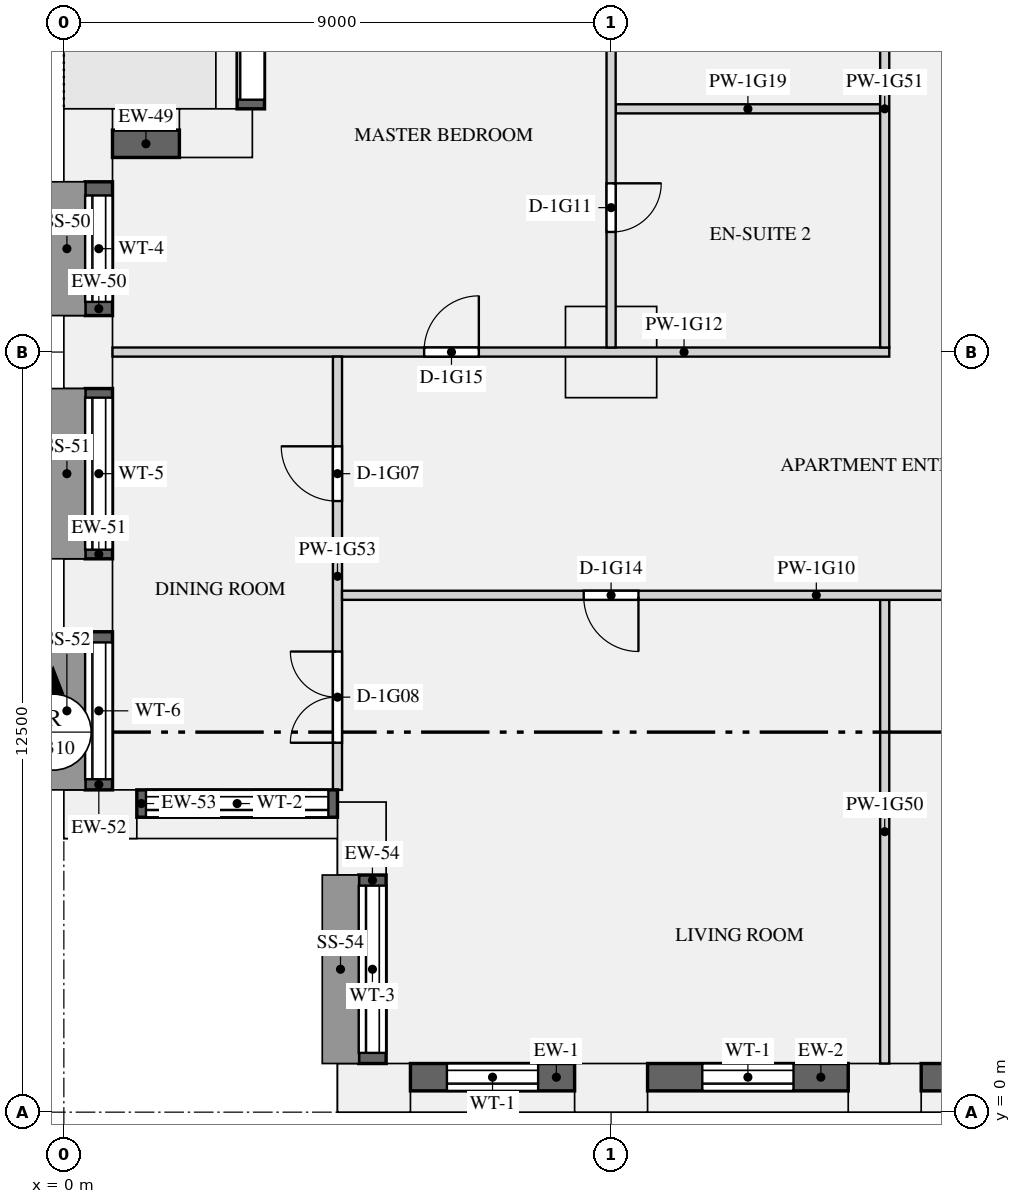
"""IFC4 building model, lengths in metres.
Left out: names, types, materials, properties, quantities, classifications, styles, units other than length and angle.
Written with IfcOpenShell. Run it as: python <this file> out.ifc"""

import sys

from ifc_helpers import new_model, si_unit, direction, frame, frame_2d, origin, origin_2d, place, context, subcontext, project, spatial, rectangle, extrude, element, fill, save


model = new_model("IFC4")
c1 = context("Model", 3, precision=1e-05, world=origin(), true_north=direction((0.0, 1.0)))
c2 = subcontext(c1, "Body", "Model", "MODEL_VIEW")
j1 = project(units=[si_unit("LENGTHUNIT", "METRE"), si_unit("PLANEANGLEUNIT", "RADIAN")], contexts=[c1])
p1 = place(None, origin())
s1 = spatial("IfcSite", under=j1, at=p1, CompositionType="ELEMENT")
p2 = place(p1, origin())
s2 = spatial("IfcBuilding", under=s1, at=p2, CompositionType="ELEMENT")
p3 = place(p2, frame((0.0, 0.0, 69.9)))
s3 = spatial("IfcBuildingStorey", under=s2, at=p3, CompositionType="ELEMENT", Elevation=69.9)
p4 = place(p3, frame((5.1, 0.4, 0.0), z_axis=(0.0, 0.0, 1.0), x_axis=(1.0, 0.0, 0.0)))
e1 = element("IfcColumn", 1, at=p4, inside=s3, PredefinedType="USERDEFINED", context=c2, shape_type="SweptSolid", body=[
    extrude(rectangle(XDim=1.2, YDim=0.8, at=origin_2d()), origin(), (0.0, 0.0, 1.0), 2.65),
])
for number, where, z_axis, x_axis in (
    (2, (9.0, 0.4, 0.0), (0.0, 0.0, 1.0), (1.0, 0.0, 0.0)),
    (3, (13.5, 0.4, 0.0), (0.0, 0.0, 1.0), (1.0, 0.0, 0.0)),
):
    element("IfcColumn", number, at=place(p3, frame(where, z_axis=z_axis, x_axis=x_axis)), inside=s3, PredefinedType="USERDEFINED", context=c2, shape_type="SweptSolid", body=[
        extrude(rectangle(XDim=1.2, YDim=0.8, at=origin_2d()), origin(), (0.0, 0.0, 1.0), 3.15),
    ])
for number, where, z_axis, x_axis in (
    (4, (2.5, 16.1, 0.0), (0.0, 0.0, 1.0), (-1.0, 0.0, 0.0)),
    (5, (0.4, 15.9, 0.0), (0.0, 0.0, 1.0), (0.0, -1.0, 0.0)),
    (6, (0.4, 12.5, 0.0), (0.0, 0.0, 1.0), (0.0, -1.0, 0.0)),
    (7, (0.4, 8.5, 0.0), (0.0, 0.0, 1.0), (0.0, -1.0, 0.0)),
):
    element("IfcColumn", number, at=place(p3, frame(where, z_axis=z_axis, x_axis=x_axis)), inside=s3, PredefinedType="USERDEFINED", context=c2, shape_type="SweptSolid", body=[
        extrude(rectangle(XDim=1.2, YDim=0.8, at=origin_2d()), origin(), (0.0, 0.0, 1.0), 2.65),
    ])
for number, where, z_axis, x_axis in (
    (8, (0.6, 4.9, 0.0), (0.0, 0.0, 1.0), (1.0, 0.0, 0.0)),
    (9, (4.9, 4.5, 0.0), (0.0, 0.0, 1.0), (0.0, -1.0, 0.0)),
):
    element("IfcColumn", number, at=place(p3, frame(where, z_axis=z_axis, x_axis=x_axis)), inside=s3, PredefinedType="USERDEFINED", context=c2, shape_type="SweptSolid", body=[
        extrude(rectangle(XDim=1.2, YDim=0.8, at=origin_2d()), origin(), (0.0, 0.0, 1.0), 3.15),
    ])
p5 = place(p3, frame((9.0, 12.5, 0.0), z_axis=(0.0, 0.0, 1.0), x_axis=(1.0, 0.0, 0.0)))
e10 = element("IfcColumn", 10, at=p5, inside=s3, PredefinedType="COLUMN", context=c2, shape_type="SweptSolid", body=[
    extrude(rectangle(XDim=1.5, YDim=1.5, at=origin_2d()), origin(), (0.0, 0.0, 1.0), 3.15),
])
p6 = place(p3, frame((5.7, 0.575, 0.9), z_axis=(0.0, 0.0, 1.0), x_axis=(1.0, 0.0, 0.0)))
e11 = element("IfcWall", 11, at=p6, inside=s3, PredefinedType="SOLIDWALL", context=c2, shape_type="SweptSolid", body=[
    extrude(rectangle(XDim=2.7, YDim=0.45, at=frame_2d((1.35, 0.0))), origin(), (0.0, 0.0, 1.0), 1.75),
])
p7 = place(p6, frame((0.6, 0.0, 0.15)))
e12 = element("IfcOpeningElement", 12, at=p7, cuts=e11, PredefinedType="OPENING", context=c2, shape_type="SweptSolid", body=[
    extrude(rectangle(XDim=1.5, YDim=1.5, at=frame_2d((0.75, 0.75))), frame((0.0, 0.235, 0.0), z_axis=(0.0, -1.0, 0.0), x_axis=(1.0, 0.0, 0.0)), (0.0, 0.0, 1.0), 0.47),
])
p8 = place(p3, frame((9.6, 0.575, 0.9), z_axis=(0.0, 0.0, 1.0), x_axis=(1.0, 0.0, 0.0)))
e13 = element("IfcWall", 13, at=p8, inside=s3, PredefinedType="SOLIDWALL", context=c2, shape_type="SweptSolid", body=[
    extrude(rectangle(XDim=3.3, YDim=0.45, at=frame_2d((1.65, 0.0))), origin(), (0.0, 0.0, 1.0), 1.75),
])
p9 = place(p8, frame((0.9, 0.0, 0.15)))
e14 = element("IfcOpeningElement", 14, at=p9, cuts=e13, PredefinedType="OPENING", context=c2, shape_type="SweptSolid", body=[
    extrude(rectangle(XDim=1.5, YDim=1.5, at=frame_2d((0.75, 0.75))), frame((0.0, 0.235, 0.0), z_axis=(0.0, -1.0, 0.0), x_axis=(1.0, 0.0, 0.0)), (0.0, 0.0, 1.0), 0.47),
])
p10 = place(p3, frame((14.1, 0.575, 0.9), z_axis=(0.0, 0.0, 1.0), x_axis=(1.0, 0.0, 0.0)))
e15 = element("IfcWall", 15, at=p10, inside=s3, PredefinedType="SOLIDWALL", context=c2, shape_type="SweptSolid", body=[
    extrude(rectangle(XDim=3.9, YDim=0.45, at=frame_2d((1.95, 0.0))), origin(), (0.0, 0.0, 1.0), 1.75),
])
p11 = place(p10, frame((1.2, 0.0, 0.15)))
e16 = element("IfcOpeningElement", 16, at=p11, cuts=e15, PredefinedType="OPENING", context=c2, shape_type="SweptSolid", body=[
    extrude(rectangle(XDim=1.5, YDim=1.5, at=frame_2d((0.75, 0.75))), frame((0.0, 0.235, 0.0), z_axis=(0.0, -1.0, 0.0), x_axis=(1.0, 0.0, 0.0)), (0.0, 0.0, 1.0), 0.47),
])
p12 = place(p3, frame((3.075, 19.9, 0.0), z_axis=(0.0, 0.0, 1.0), x_axis=(0.0, -1.0, 0.0)))
e17 = element("IfcWall", 17, at=p12, inside=s3, PredefinedType="SOLIDWALL", context=c2, shape_type="SweptSolid", body=[
    extrude(rectangle(XDim=3.4, YDim=0.45, at=frame_2d((1.7, 0.0))), origin(), (0.0, 0.0, 1.0), 2.65),
])
p13 = place(p12, frame((0.15, 0.0, 0.0)))
e18 = element("IfcOpeningElement", 18, at=p13, cuts=e17, PredefinedType="OPENING", context=c2, shape_type="SweptSolid", body=[
    extrude(rectangle(XDim=3.1, YDim=2.3, at=frame_2d((1.55, 1.15))), frame((0.0, 0.235, 0.0), z_axis=(0.0, -1.0, 0.0), x_axis=(1.0, 0.0, 0.0)), (0.0, 0.0, 1.0), 0.47),
])
p14 = place(p3, frame((1.9, 15.925, 0.9), z_axis=(0.0, 0.0, 1.0), x_axis=(-1.0, 0.0, 0.0)))
e19 = element("IfcWall", 19, at=p14, inside=s3, PredefinedType="SOLIDWALL", context=c2, shape_type="SweptSolid", body=[
    extrude(rectangle(XDim=1.1, YDim=0.45, at=frame_2d((0.55, 0.0))), origin(), (0.0, 0.0, 1.0), 1.75),
])
p15 = place(p3, frame((0.575, 15.3, 0.9), z_axis=(0.0, 0.0, 1.0), x_axis=(0.0, -1.0, 0.0)))
e20 = element("IfcWall", 20, at=p15, inside=s3, PredefinedType="SOLIDWALL", context=c2, shape_type="SweptSolid", body=[
    extrude(rectangle(XDim=2.2, YDim=0.45, at=frame_2d((1.1, 0.0))), origin(), (0.0, 0.0, 1.0), 1.75),
])
p16 = place(p15, frame((0.225, 0.0, 0.15)))
e21 = element("IfcOpeningElement", 21, at=p16, cuts=e20, PredefinedType="OPENING", context=c2, shape_type="SweptSolid", body=[
    extrude(rectangle(XDim=1.75, YDim=1.5, at=frame_2d((0.875, 0.75))), frame((0.0, 0.235, 0.0), z_axis=(0.0, -1.0, 0.0), x_axis=(1.0, 0.0, 0.0)), (0.0, 0.0, 1.0), 0.47),
])
p17 = place(p3, frame((0.575, 11.9, 0.9), z_axis=(0.0, 0.0, 1.0), x_axis=(0.0, -1.0, 0.0)))
e22 = element("IfcWall", 22, at=p17, inside=s3, PredefinedType="SOLIDWALL", context=c2, shape_type="SweptSolid", body=[
    extrude(rectangle(XDim=2.8, YDim=0.45, at=frame_2d((1.4, 0.0))), origin(), (0.0, 0.0, 1.0), 1.75),
])
p18 = place(p17, frame((0.15, 0.0, 0.15)))
e23 = element("IfcOpeningElement", 23, at=p18, cuts=e22, PredefinedType="OPENING", context=c2, shape_type="SweptSolid", body=[
    extrude(rectangle(XDim=2.5, YDim=1.5, at=frame_2d((1.25, 0.75))), frame((0.0, 0.235, 0.0), z_axis=(0.0, -1.0, 0.0), x_axis=(1.0, 0.0, 0.0)), (0.0, 0.0, 1.0), 0.47),
])
p19 = place(p3, frame((0.575, 7.9, 0.9), z_axis=(0.0, 0.0, 1.0), x_axis=(0.0, -1.0, 0.0)))
e24 = element("IfcWall", 24, at=p19, inside=s3, PredefinedType="SOLIDWALL", context=c2, shape_type="SweptSolid", body=[
    extrude(rectangle(XDim=2.6, YDim=0.45, at=frame_2d((1.3, 0.0))), origin(), (0.0, 0.0, 1.0), 1.75),
])
p20 = place(p19, frame((0.175, 0.0, 0.15)))
e25 = element("IfcOpeningElement", 25, at=p20, cuts=e24, PredefinedType="OPENING", context=c2, shape_type="SweptSolid", body=[
    extrude(rectangle(XDim=2.25, YDim=1.5, at=frame_2d((1.125, 0.75))), frame((0.0, 0.235, 0.0), z_axis=(0.0, -1.0, 0.0), x_axis=(1.0, 0.0, 0.0)), (0.0, 0.0, 1.0), 0.47),
])
p21 = place(p3, frame((1.2, 5.075, 0.9), z_axis=(0.0, 0.0, 1.0), x_axis=(1.0, 0.0, 0.0)))
e26 = element("IfcWall", 26, at=p21, inside=s3, PredefinedType="SOLIDWALL", context=c2, shape_type="SweptSolid", body=[
    extrude(rectangle(XDim=3.3, YDim=0.45, at=frame_2d((1.65, 0.0))), origin(), (0.0, 0.0, 1.0), 1.75),
])
p22 = place(p21, frame((0.15, 0.0, 0.15)))
e27 = element("IfcOpeningElement", 27, at=p22, cuts=e26, PredefinedType="OPENING", context=c2, shape_type="SweptSolid", body=[
    extrude(rectangle(XDim=3.0, YDim=1.5, at=frame_2d((1.5, 0.75))), frame((0.0, 0.235, 0.0), z_axis=(0.0, -1.0, 0.0), x_axis=(1.0, 0.0, 0.0)), (0.0, 0.0, 1.0), 0.47),
])
p23 = place(p3, frame((5.075, 3.9, 0.9), z_axis=(0.0, 0.0, 1.0), x_axis=(0.0, -1.0, 0.0)))
e28 = element("IfcWall", 28, at=p23, inside=s3, PredefinedType="SOLIDWALL", context=c2, shape_type="SweptSolid", body=[
    extrude(rectangle(XDim=3.1, YDim=0.45, at=frame_2d((1.55, 0.0))), origin(), (0.0, 0.0, 1.0), 1.75),
])
p24 = place(p23, frame((0.175, 0.0, 0.15)))
e29 = element("IfcOpeningElement", 29, at=p24, cuts=e28, PredefinedType="OPENING", context=c2, shape_type="SweptSolid", body=[
    extrude(rectangle(XDim=2.75, YDim=1.5, at=frame_2d((1.375, 0.75))), frame((0.0, 0.235, 0.0), z_axis=(0.0, -1.0, 0.0), x_axis=(1.0, 0.0, 0.0)), (0.0, 0.0, 1.0), 0.47),
])
p25 = place(p3, frame((4.575, 8.5, 0.0), z_axis=(0.0, 0.0, 1.0), x_axis=(1.0, 0.0, 0.0)))
e30 = element("IfcWall", 30, at=p25, inside=s3, PredefinedType="PARTITIONING", context=c2, shape_type="SweptSolid", body=[
    extrude(rectangle(XDim=13.425, YDim=0.15, at=frame_2d((6.712, 0.0))), origin(), (0.0, 0.0, 1.0), 2.65),
])
p26 = place(p25, frame((10.725, 0.0, 0.0)))
e31 = element("IfcOpeningElement", 31, at=p26, cuts=e30, PredefinedType="OPENING", context=c2, shape_type="SweptSolid", body=[
    extrude(rectangle(XDim=0.9, YDim=2.1, at=frame_2d((0.45, 1.05))), frame((0.0, 0.085, 0.0), z_axis=(0.0, -1.0, 0.0), x_axis=(1.0, 0.0, 0.0)), (0.0, 0.0, 1.0), 0.17),
])
p27 = place(p25, frame((3.975, 0.0, 0.0)))
e32 = element("IfcOpeningElement", 32, at=p27, cuts=e30, PredefinedType="OPENING", context=c2, shape_type="SweptSolid", body=[
    extrude(rectangle(XDim=0.9, YDim=2.1, at=frame_2d((0.45, 1.05))), frame((0.0, 0.085, 0.0), z_axis=(0.0, -1.0, 0.0), x_axis=(1.0, 0.0, 0.0)), (0.0, 0.0, 1.0), 0.17),
])
p28 = place(p3, frame((0.8, 12.5, 0.0), z_axis=(0.0, 0.0, 1.0), x_axis=(1.0, 0.0, 0.0)))
e33 = element("IfcWall", 33, at=p28, inside=s3, PredefinedType="PARTITIONING", context=c2, shape_type="SweptSolid", body=[
    extrude(rectangle(XDim=12.775, YDim=0.15, at=frame_2d((6.387, 0.0))), origin(), (0.0, 0.0, 1.0), 2.65),
])
p29 = place(p28, frame((5.125, 0.0, 0.0)))
e34 = element("IfcOpeningElement", 34, at=p29, cuts=e33, PredefinedType="OPENING", context=c2, shape_type="SweptSolid", body=[
    extrude(rectangle(XDim=0.9, YDim=2.1, at=frame_2d((0.45, 1.05))), frame((0.0, 0.085, 0.0), z_axis=(0.0, -1.0, 0.0), x_axis=(1.0, 0.0, 0.0)), (0.0, 0.0, 1.0), 0.17),
])
p30 = place(p3, frame((9.075, 16.5, 0.0), z_axis=(0.0, 0.0, 1.0), x_axis=(1.0, 0.0, 0.0)))
e35 = element("IfcWall", 35, at=p30, inside=s3, PredefinedType="PARTITIONING", context=c2, shape_type="SweptSolid", body=[
    extrude(rectangle(XDim=4.35, YDim=0.15, at=frame_2d((2.175, 0.0))), origin(), (0.0, 0.0, 1.0), 2.65),
])
p31 = place(p3, frame((13.5, 0.8, 0.0), z_axis=(0.0, 0.0, 1.0), x_axis=(0.0, 1.0, 0.0)))
e36 = element("IfcWall", 36, at=p31, inside=s3, PredefinedType="PARTITIONING", context=c2, shape_type="SweptSolid", body=[
    extrude(rectangle(XDim=7.625, YDim=0.15, at=frame_2d((3.812, 0.0))), origin(), (0.0, 0.0, 1.0), 2.65),
])
p32 = place(p3, frame((13.5, 12.575, 0.0), z_axis=(0.0, 0.0, 1.0), x_axis=(0.0, 1.0, 0.0)))
e37 = element("IfcWall", 37, at=p32, inside=s3, PredefinedType="PARTITIONING", context=c2, shape_type="SweptSolid", body=[
    extrude(rectangle(XDim=7.85, YDim=0.15, at=frame_2d((3.925, 0.0))), origin(), (0.0, 0.0, 1.0), 2.65),
])
p33 = place(p3, frame((4.5, 5.3, 0.0), z_axis=(0.0, 0.0, 1.0), x_axis=(0.0, 1.0, 0.0)))
e38 = element("IfcWall", 38, at=p33, inside=s3, PredefinedType="PARTITIONING", context=c2, shape_type="SweptSolid", body=[
    extrude(rectangle(XDim=7.125, YDim=0.15, at=frame_2d((3.562, 0.0))), origin(), (0.0, 0.0, 1.0), 2.65),
])
p34 = place(p33, frame((4.75, 0.0, 0.0)))
e39 = element("IfcOpeningElement", 39, at=p34, cuts=e38, PredefinedType="OPENING", context=c2, shape_type="SweptSolid", body=[
    extrude(rectangle(XDim=0.9, YDim=2.1, at=frame_2d((0.45, 1.05))), frame((0.0, 0.085, 0.0), z_axis=(0.0, -1.0, 0.0), x_axis=(1.0, 0.0, 0.0)), (0.0, 0.0, 1.0), 0.17),
])
p35 = place(p33, frame((0.775, 0.0, 0.0)))
e40 = element("IfcOpeningElement", 40, at=p35, cuts=e38, PredefinedType="OPENING", context=c2, shape_type="SweptSolid", body=[
    extrude(rectangle(XDim=1.5, YDim=2.1, at=frame_2d((0.75, 1.05))), frame((0.0, 0.085, 0.0), z_axis=(0.0, -1.0, 0.0), x_axis=(1.0, 0.0, 0.0)), (0.0, 0.0, 1.0), 0.17),
])
p36 = place(p3, frame((9.0, 12.575, 0.0), z_axis=(0.0, 0.0, 1.0), x_axis=(0.0, 1.0, 0.0)))
e41 = element("IfcWall", 41, at=p36, inside=s3, PredefinedType="PARTITIONING", context=c2, shape_type="SweptSolid", body=[
    extrude(rectangle(XDim=7.85, YDim=0.15, at=frame_2d((3.925, 0.0))), origin(), (0.0, 0.0, 1.0), 2.65),
])
p37 = place(p36, frame((1.9, 0.0, 0.0)))
e42 = element("IfcOpeningElement", 42, at=p37, cuts=e41, PredefinedType="OPENING", context=c2, shape_type="SweptSolid", body=[
    extrude(rectangle(XDim=0.8, YDim=2.1, at=frame_2d((0.4, 1.05))), frame((0.0, 0.085, 0.0), z_axis=(0.0, -1.0, 0.0), x_axis=(1.0, 0.0, 0.0)), (0.0, 0.0, 1.0), 0.17),
])
p38 = place(p7, origin())
e43 = element("IfcWindow", 43, at=p38, inside=s3, PartitioningType="SINGLE_PANEL", PredefinedType="WINDOW", context=c2, shape_type="SweptSolid", body=[
    extrude(rectangle(XDim=1.5, YDim=1.5, at=frame_2d((0.75, 0.75))), frame((0.0, -0.065, 0.0), z_axis=(0.0, -1.0, 0.0), x_axis=(1.0, 0.0, 0.0)), (0.0, 0.0, 1.0), 0.06),
])
fill(e12, e43)
p39 = place(p9, origin())
e44 = element("IfcWindow", 44, at=p39, inside=s3, PartitioningType="SINGLE_PANEL", PredefinedType="WINDOW", context=c2, shape_type="SweptSolid", body=[
    extrude(rectangle(XDim=1.5, YDim=1.5, at=frame_2d((0.75, 0.75))), frame((0.0, -0.065, 0.0), z_axis=(0.0, -1.0, 0.0), x_axis=(1.0, 0.0, 0.0)), (0.0, 0.0, 1.0), 0.06),
])
fill(e14, e44)
p40 = place(p13, origin())
e45 = element("IfcDoor", 45, at=p40, inside=s3, OperationType="SLIDING_TO_LEFT", PredefinedType="DOOR", context=c2, shape_type="SweptSolid", body=[
    extrude(rectangle(XDim=3.1, YDim=2.3, at=frame_2d((1.55, 1.15))), frame((0.0, -0.07, 0.0), z_axis=(0.0, -1.0, 0.0), x_axis=(1.0, 0.0, 0.0)), (0.0, 0.0, 1.0), 0.05),
])
fill(e18, e45)
p41 = place(p16, origin())
e46 = element("IfcWindow", 46, at=p41, inside=s3, PartitioningType="SINGLE_PANEL", PredefinedType="WINDOW", context=c2, shape_type="SweptSolid", body=[
    extrude(rectangle(XDim=1.75, YDim=1.5, at=frame_2d((0.875, 0.75))), frame((0.0, -0.065, 0.0), z_axis=(0.0, -1.0, 0.0), x_axis=(1.0, 0.0, 0.0)), (0.0, 0.0, 1.0), 0.06),
])
fill(e21, e46)
p42 = place(p18, origin())
e47 = element("IfcWindow", 47, at=p42, inside=s3, PartitioningType="SINGLE_PANEL", PredefinedType="WINDOW", context=c2, shape_type="SweptSolid", body=[
    extrude(rectangle(XDim=2.5, YDim=1.5, at=frame_2d((1.25, 0.75))), frame((0.0, -0.065, 0.0), z_axis=(0.0, -1.0, 0.0), x_axis=(1.0, 0.0, 0.0)), (0.0, 0.0, 1.0), 0.06),
])
fill(e23, e47)
p43 = place(p20, origin())
e48 = element("IfcWindow", 48, at=p43, inside=s3, PartitioningType="SINGLE_PANEL", PredefinedType="WINDOW", context=c2, shape_type="SweptSolid", body=[
    extrude(rectangle(XDim=2.25, YDim=1.5, at=frame_2d((1.125, 0.75))), frame((0.0, -0.065, 0.0), z_axis=(0.0, -1.0, 0.0), x_axis=(1.0, 0.0, 0.0)), (0.0, 0.0, 1.0), 0.06),
])
fill(e25, e48)
p44 = place(p22, origin())
e49 = element("IfcWindow", 49, at=p44, inside=s3, PartitioningType="SINGLE_PANEL", PredefinedType="WINDOW", context=c2, shape_type="SweptSolid", body=[
    extrude(rectangle(XDim=3.0, YDim=1.5, at=frame_2d((1.5, 0.75))), frame((0.0, -0.065, 0.0), z_axis=(0.0, -1.0, 0.0), x_axis=(1.0, 0.0, 0.0)), (0.0, 0.0, 1.0), 0.06),
])
fill(e27, e49)
p45 = place(p24, origin())
e50 = element("IfcWindow", 50, at=p45, inside=s3, PartitioningType="SINGLE_PANEL", PredefinedType="WINDOW", context=c2, shape_type="SweptSolid", body=[
    extrude(rectangle(XDim=2.75, YDim=1.5, at=frame_2d((1.375, 0.75))), frame((0.0, -0.065, 0.0), z_axis=(0.0, -1.0, 0.0), x_axis=(1.0, 0.0, 0.0)), (0.0, 0.0, 1.0), 0.06),
])
fill(e29, e50)
p46 = place(p34, origin())
e51 = element("IfcDoor", 51, at=p46, inside=s3, OperationType="SINGLE_SWING_RIGHT", PredefinedType="DOOR", context=c2, shape_type="SweptSolid", body=[
    extrude(rectangle(XDim=0.9, YDim=2.1, at=frame_2d((0.45, 1.05))), frame((0.0, 0.025, 0.0), z_axis=(0.0, -1.0, 0.0), x_axis=(1.0, 0.0, 0.0)), (0.0, 0.0, 1.0), 0.05),
])
fill(e39, e51)
p47 = place(p35, origin())
e52 = element("IfcDoor", 52, at=p47, inside=s3, OperationType="DOUBLE_DOOR_SINGLE_SWING", PredefinedType="DOOR", context=c2, shape_type="SweptSolid", body=[
    extrude(rectangle(XDim=1.5, YDim=2.1, at=frame_2d((0.75, 1.05))), frame((0.0, 0.025, 0.0), z_axis=(0.0, -1.0, 0.0), x_axis=(1.0, 0.0, 0.0)), (0.0, 0.0, 1.0), 0.05),
])
fill(e40, e52)
p48 = place(p37, frame((0.8, 0.0, 0.0), z_axis=(0.0, 0.0, 1.0), x_axis=(-1.0, 0.0, 0.0)))
e53 = element("IfcDoor", 53, at=p48, inside=s3, OperationType="SINGLE_SWING_LEFT", PredefinedType="DOOR", context=c2, shape_type="SweptSolid", body=[
    extrude(rectangle(XDim=0.8, YDim=2.1, at=frame_2d((0.4, 1.05))), frame((0.0, 0.025, 0.0), z_axis=(0.0, -1.0, 0.0), x_axis=(1.0, 0.0, 0.0)), (0.0, 0.0, 1.0), 0.05),
])
fill(e42, e53)
p49 = place(p27, frame((0.9, 0.0, 0.0), z_axis=(0.0, 0.0, 1.0), x_axis=(-1.0, 0.0, 0.0)))
e54 = element("IfcDoor", 54, at=p49, inside=s3, OperationType="SINGLE_SWING_LEFT", PredefinedType="DOOR", context=c2, shape_type="SweptSolid", body=[
    extrude(rectangle(XDim=0.9, YDim=2.1, at=frame_2d((0.45, 1.05))), frame((0.0, 0.025, 0.0), z_axis=(0.0, -1.0, 0.0), x_axis=(1.0, 0.0, 0.0)), (0.0, 0.0, 1.0), 0.05),
])
fill(e32, e54)
p50 = place(p29, origin())
e55 = element("IfcDoor", 55, at=p50, inside=s3, OperationType="SINGLE_SWING_RIGHT", PredefinedType="DOOR", context=c2, shape_type="SweptSolid", body=[
    extrude(rectangle(XDim=0.9, YDim=2.1, at=frame_2d((0.45, 1.05))), frame((0.0, 0.025, 0.0), z_axis=(0.0, -1.0, 0.0), x_axis=(1.0, 0.0, 0.0)), (0.0, 0.0, 1.0), 0.05),
])
fill(e34, e55)
save(model, sys.argv[1])
